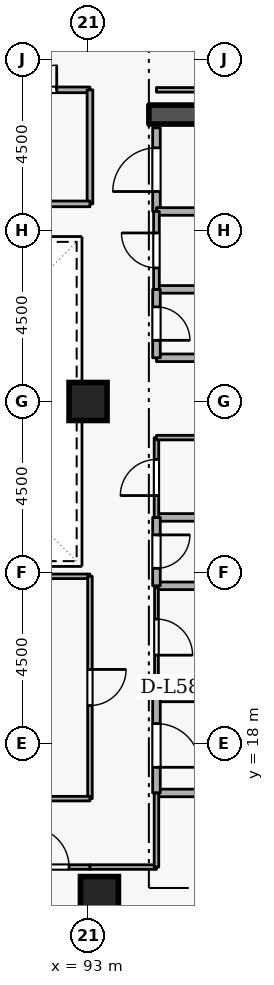
"""IFC4 building model, lengths in metres.
Left out: names, types, materials, properties, quantities, classifications, styles, units other than length and angle.
Written with IfcOpenShell. Run it as: python <this file> out.ifc"""

import sys

from ifc_helpers import new_model, si_unit, direction, frame, frame_2d, origin, origin_2d, place, context, subcontext, project, spatial, rectangle, extrude, element, fill, save


model = new_model("IFC4")
c1 = context("Model", 3, precision=1e-05, world=origin(), true_north=direction((0.0, 1.0)))
c2 = subcontext(c1, "Body", "Model", "MODEL_VIEW")
j1 = project(units=[si_unit("LENGTHUNIT", "METRE"), si_unit("PLANEANGLEUNIT", "RADIAN")], contexts=[c1])
p1 = place(None, origin())
s1 = spatial("IfcSite", under=j1, at=p1, CompositionType="ELEMENT")
p2 = place(p1, origin())
s2 = spatial("IfcBuilding", under=s1, at=p2, CompositionType="ELEMENT")
p3 = place(p2, frame((0.0, 0.0, 218.1)))
s3 = spatial("IfcBuildingStorey", under=s2, at=p3, CompositionType="ELEMENT", Elevation=218.1)
p4 = place(p3, frame((94.6, 34.55, 0.0), z_axis=(0.0, 0.0, 1.0), x_axis=(1.0, 0.0, 0.0)))
e1 = element("IfcWall", 1, at=p4, inside=s3, PredefinedType="SHEAR", context=c2, shape_type="SweptSolid", body=[
    extrude(rectangle(XDim=5.8, YDim=0.5, at=frame_2d((2.9, 0.0))), origin(), (0.0, 0.0, 1.0), 3.6),
])
for number, where, z_axis, x_axis in (
    (2, (93.3, 14.0, 0.0), (0.0, 0.0, 1.0), (1.0, 0.0, 0.0)),
    (3, (93.0, 27.0, 0.0), (0.0, 0.0, 1.0), (1.0, 0.0, 0.0)),
):
    element("IfcColumn", number, at=place(p3, frame(where, z_axis=z_axis, x_axis=x_axis)), inside=s3, PredefinedType="COLUMN", context=c2, shape_type="SweptSolid", body=[
        extrude(rectangle(XDim=1.0, YDim=1.0, at=origin_2d()), origin(), (0.0, 0.0, 1.0), 3.6),
    ])
p5 = place(p3, frame((94.8, 16.7, 0.0), z_axis=(0.0, 0.0, 1.0), x_axis=(1.0, 0.0, 0.0)))
e4 = element("IfcWall", 4, at=p5, inside=s3, PredefinedType="STANDARD", context=c2, shape_type="SweptSolid", body=[
    extrude(rectangle(XDim=5.7, YDim=0.2, at=frame_2d((2.85, 0.0))), origin(), (0.0, 0.0, 1.0), 3.26),
])
p6 = place(p3, frame((97.1, 19.2, 0.0), z_axis=(0.0, 0.0, 1.0), x_axis=(-1.0, 0.0, 0.0)))
e5 = element("IfcWall", 5, at=p6, inside=s3, PredefinedType="STANDARD", context=c2, shape_type="SweptSolid", body=[
    extrude(rectangle(XDim=2.3, YDim=0.2, at=frame_2d((1.15, 0.0))), origin(), (0.0, 0.0, 1.0), 2.465),
])
p7 = place(p3, frame((94.8, 19.2, 0.0), z_axis=(0.0, 0.0, 1.0), x_axis=(0.0, -1.0, 0.0)))
e6 = element("IfcWall", 6, at=p7, inside=s3, PredefinedType="STANDARD", context=c2, shape_type="SweptSolid", body=[
    extrude(rectangle(XDim=2.5, YDim=0.2, at=frame_2d((1.25, 0.0))), origin(), (0.0, 0.0, 1.0), 3.26),
])
p8 = place(p7, frame((0.675, 0.0, 0.0)))
e7 = element("IfcOpeningElement", 7, at=p8, cuts=e6, PredefinedType="OPENING", context=c2, shape_type="SweptSolid", body=[
    extrude(rectangle(XDim=1.15, YDim=2.1, at=frame_2d((0.575, 1.05))), frame((0.0, 0.11, 0.0), z_axis=(0.0, -1.0, 0.0), x_axis=(1.0, 0.0, 0.0)), (0.0, 0.0, 1.0), 0.22),
])
for number, where, z_axis, x_axis in (
    (8, (94.8, 28.15, 0.0), (0.0, 0.0, 1.0), (1.0, 0.0, 0.0)),
    (9, (96.85, 29.95, 0.0), (0.0, 0.0, 1.0), (-1.0, 0.0, 0.0)),
):
    element("IfcWall", number, at=place(p3, frame(where, z_axis=z_axis, x_axis=x_axis)), inside=s3, PredefinedType="STANDARD", context=c2, shape_type="SweptSolid", body=[
        extrude(rectangle(XDim=2.05, YDim=0.2, at=frame_2d((1.025, 0.0))), origin(), (0.0, 0.0, 1.0), 3.26),
    ])
p9 = place(p3, frame((94.8, 29.95, 0.0), z_axis=(0.0, 0.0, 1.0), x_axis=(0.0, -1.0, 0.0)))
e10 = element("IfcWall", 10, at=p9, inside=s3, PredefinedType="STANDARD", context=c2, shape_type="SweptSolid", body=[
    extrude(rectangle(XDim=1.8, YDim=0.2, at=frame_2d((0.9, 0.0))), origin(), (0.0, 0.0, 1.0), 3.26),
])
p10 = place(p9, frame((0.46, 0.0, 0.0)))
e11 = element("IfcOpeningElement", 11, at=p10, cuts=e10, PredefinedType="OPENING", context=c2, shape_type="SweptSolid", body=[
    extrude(rectangle(XDim=0.88, YDim=2.04, at=frame_2d((0.44, 1.02))), frame((0.0, 0.11, 0.0), z_axis=(0.0, -1.0, 0.0), x_axis=(1.0, 0.0, 0.0)), (0.0, 0.0, 1.0), 0.22),
])
for number, where, z_axis, x_axis in (
    (12, (94.8, 22.15, 0.0), (0.0, 0.0, 1.0), (1.0, 0.0, 0.0)),
    (13, (96.85, 23.95, 0.0), (0.0, 0.0, 1.0), (-1.0, 0.0, 0.0)),
):
    element("IfcWall", number, at=place(p3, frame(where, z_axis=z_axis, x_axis=x_axis)), inside=s3, PredefinedType="STANDARD", context=c2, shape_type="SweptSolid", body=[
        extrude(rectangle(XDim=2.05, YDim=0.2, at=frame_2d((1.025, 0.0))), origin(), (0.0, 0.0, 1.0), 3.26),
    ])
p11 = place(p3, frame((94.8, 23.95, 0.0), z_axis=(0.0, 0.0, 1.0), x_axis=(0.0, -1.0, 0.0)))
e14 = element("IfcWall", 14, at=p11, inside=s3, PredefinedType="STANDARD", context=c2, shape_type="SweptSolid", body=[
    extrude(rectangle(XDim=1.8, YDim=0.2, at=frame_2d((0.9, 0.0))), origin(), (0.0, 0.0, 1.0), 3.26),
])
p12 = place(p11, frame((0.46, 0.0, 0.0)))
e15 = element("IfcOpeningElement", 15, at=p12, cuts=e14, PredefinedType="OPENING", context=c2, shape_type="SweptSolid", body=[
    extrude(rectangle(XDim=0.88, YDim=2.04, at=frame_2d((0.44, 1.02))), frame((0.0, 0.11, 0.0), z_axis=(0.0, -1.0, 0.0), x_axis=(1.0, 0.0, 0.0)), (0.0, 0.0, 1.0), 0.22),
])
p13 = place(p3, frame((94.8, 32.0, 0.0), z_axis=(0.0, 0.0, 1.0), x_axis=(0.0, 1.0, 0.0)))
e16 = element("IfcWall", 16, at=p13, inside=s3, PredefinedType="STANDARD", context=c2, shape_type="SweptSolid", body=[
    extrude(rectangle(XDim=2.2, YDim=0.2, at=frame_2d((1.1, 0.0))), origin(), (0.0, 0.0, 1.0), 3.26),
])
p14 = place(p13, frame((0.525, 0.0, 0.0)))
e17 = element("IfcOpeningElement", 17, at=p14, cuts=e16, PredefinedType="OPENING", context=c2, shape_type="SweptSolid", body=[
    extrude(rectangle(XDim=1.15, YDim=2.1, at=frame_2d((0.575, 1.05))), frame((0.0, 0.11, 0.0), z_axis=(0.0, -1.0, 0.0), x_axis=(1.0, 0.0, 0.0)), (0.0, 0.0, 1.0), 0.22),
])
p15 = place(p3, frame((96.85, 32.0, 0.0), z_axis=(0.0, 0.0, 1.0), x_axis=(-1.0, 0.0, 0.0)))
e18 = element("IfcWall", 18, at=p15, inside=s3, PredefinedType="STANDARD", context=c2, shape_type="SweptSolid", body=[
    extrude(rectangle(XDim=2.05, YDim=0.2, at=frame_2d((1.025, 0.0))), origin(), (0.0, 0.0, 1.0), 3.26),
])
p16 = place(p3, frame((94.8, 19.5, 0.0), z_axis=(0.0, 0.0, 1.0), x_axis=(1.0, 0.0, 0.0)))
e19 = element("IfcWall", 19, at=p16, inside=s3, PredefinedType="PARTITIONING", context=c2, shape_type="SweptSolid", body=[
    extrude(rectangle(XDim=2.05, YDim=0.1, at=frame_2d((1.025, 0.0))), origin(), (0.0, 0.0, 1.0), 2.465),
])
p17 = place(p3, frame((94.8, 22.1, 0.0), z_axis=(0.0, 0.0, 1.0), x_axis=(0.0, -1.0, 0.0)))
e20 = element("IfcWall", 20, at=p17, inside=s3, PredefinedType="PARTITIONING", context=c2, shape_type="SweptSolid", body=[
    extrude(rectangle(XDim=2.6, YDim=0.1, at=frame_2d((1.3, 0.0))), origin(), (0.0, 0.0, 1.0), 3.26),
])
p18 = place(p17, frame((0.825, 0.0, 0.0)))
e21 = element("IfcOpeningElement", 21, at=p18, cuts=e20, PredefinedType="OPENING", context=c2, shape_type="SweptSolid", body=[
    extrude(rectangle(XDim=0.95, YDim=2.1, at=frame_2d((0.475, 1.05))), frame((0.0, 0.06, 0.0), z_axis=(0.0, -1.0, 0.0), x_axis=(1.0, 0.0, 0.0)), (0.0, 0.0, 1.0), 0.12),
])
p19 = place(p3, frame((94.8, 23.95, 0.0), z_axis=(0.0, 0.0, 1.0), x_axis=(0.0, 1.0, 0.0)))
e22 = element("IfcWall", 22, at=p19, inside=s3, PredefinedType="PARTITIONING", context=c2, shape_type="SweptSolid", body=[
    extrude(rectangle(XDim=2.1, YDim=0.12, at=frame_2d((1.05, 0.0))), origin(), (0.0, 0.0, 1.0), 3.26),
])
p20 = place(p19, frame((0.575, 0.0, 0.0)))
e23 = element("IfcOpeningElement", 23, at=p20, cuts=e22, PredefinedType="OPENING", context=c2, shape_type="SweptSolid", body=[
    extrude(rectangle(XDim=0.95, YDim=2.1, at=frame_2d((0.475, 1.05))), frame((0.0, 0.07, 0.0), z_axis=(0.0, -1.0, 0.0), x_axis=(1.0, 0.0, 0.0)), (0.0, 0.0, 1.0), 0.14),
])
p21 = place(p3, frame((94.8, 26.05, 0.0), z_axis=(0.0, 0.0, 1.0), x_axis=(1.0, 0.0, 0.0)))
e24 = element("IfcWall", 24, at=p21, inside=s3, PredefinedType="PARTITIONING", context=c2, shape_type="SweptSolid", body=[
    extrude(rectangle(XDim=2.05, YDim=0.12, at=frame_2d((1.025, 0.0))), origin(), (0.0, 0.0, 1.0), 3.26),
])
p22 = place(p3, frame((94.8, 29.95, 0.0), z_axis=(0.0, 0.0, 1.0), x_axis=(0.0, 1.0, 0.0)))
e25 = element("IfcWall", 25, at=p22, inside=s3, PredefinedType="PARTITIONING", context=c2, shape_type="SweptSolid", body=[
    extrude(rectangle(XDim=2.05, YDim=0.15, at=frame_2d((1.025, 0.0))), origin(), (0.0, 0.0, 1.0), 3.26),
])
p23 = place(p22, frame((0.565, 0.0, 0.0)))
e26 = element("IfcOpeningElement", 26, at=p23, cuts=e25, PredefinedType="OPENING", context=c2, shape_type="SweptSolid", body=[
    extrude(rectangle(XDim=0.92, YDim=2.08, at=frame_2d((0.46, 1.04))), frame((0.0, 0.085, 0.0), z_axis=(0.0, -1.0, 0.0), x_axis=(1.0, 0.0, 0.0)), (0.0, 0.0, 1.0), 0.17),
])
p24 = place(p3, frame((94.8, 35.2, 0.0), z_axis=(0.0, 0.0, 1.0), x_axis=(1.0, 0.0, 0.0)))
e27 = element("IfcWall", 27, at=p24, inside=s3, PredefinedType="PARTITIONING", context=c2, shape_type="SweptSolid", body=[
    extrude(rectangle(XDim=5.9, YDim=0.12, at=frame_2d((2.95, 0.0))), origin(), (0.0, 0.0, 1.0), 3.26),
])
p25 = place(p3, frame((90.9, 14.75, 0.0), z_axis=(0.0, 0.0, 1.0), x_axis=(1.0, 0.0, 0.0)))
e28 = element("IfcWall", 28, at=p25, inside=s3, PredefinedType="PARTITIONING", context=c2, shape_type="SweptSolid", body=[
    extrude(rectangle(XDim=2.15, YDim=0.12, at=frame_2d((1.075, 0.0))), origin(), (0.0, 0.0, 1.0), 3.26),
])
p26 = place(p25, frame((0.55, 0.0, 0.0)))
e29 = element("IfcOpeningElement", 29, at=p26, cuts=e28, PredefinedType="OPENING", context=c2, shape_type="SweptSolid", body=[
    extrude(rectangle(XDim=1.05, YDim=2.1, at=frame_2d((0.525, 1.05))), frame((0.0, 0.07, 0.0), z_axis=(0.0, -1.0, 0.0), x_axis=(1.0, 0.0, 0.0)), (0.0, 0.0, 1.0), 0.14),
])
p27 = place(p3, frame((93.05, 14.75, 0.0), z_axis=(0.0, 0.0, 1.0), x_axis=(1.0, 0.0, 0.0)))
e30 = element("IfcWall", 30, at=p27, inside=s3, PredefinedType="PARTITIONING", context=c2, shape_type="SweptSolid", body=[
    extrude(rectangle(XDim=1.75, YDim=0.12, at=frame_2d((0.875, 0.0))), origin(), (0.0, 0.0, 1.0), 3.26),
])
p28 = place(p3, frame((94.8, 14.75, 0.0), z_axis=(0.0, 0.0, 1.0), x_axis=(0.0, 1.0, 0.0)))
e31 = element("IfcWall", 31, at=p28, inside=s3, PredefinedType="PARTITIONING", context=c2, shape_type="SweptSolid", body=[
    extrude(rectangle(XDim=1.95, YDim=0.12, at=frame_2d((0.975, 0.0))), origin(), (0.0, 0.0, 1.0), 3.26),
])
p29 = place(p3, frame((89.3, 22.4, 0.0), z_axis=(0.0, 0.0, 1.0), x_axis=(1.0, 0.0, 0.0)))
e32 = element("IfcWall", 32, at=p29, inside=s3, PredefinedType="PARTITIONING", context=c2, shape_type="SweptSolid", body=[
    extrude(rectangle(XDim=3.75, YDim=0.12, at=frame_2d((1.875, 0.0))), origin(), (0.0, 0.0, 1.0), 3.26),
])
p30 = place(p3, frame((93.05, 22.4, 0.0), z_axis=(0.0, 0.0, 1.0), x_axis=(0.0, -1.0, 0.0)))
e33 = element("IfcWall", 33, at=p30, inside=s3, PredefinedType="PARTITIONING", context=c2, shape_type="SweptSolid", body=[
    extrude(rectangle(XDim=5.85, YDim=0.12, at=frame_2d((2.925, 0.0))), origin(), (0.0, 0.0, 1.0), 3.26),
])
p31 = place(p30, frame((2.45, 0.0, 0.0)))
e34 = element("IfcOpeningElement", 34, at=p31, cuts=e33, PredefinedType="OPENING", context=c2, shape_type="SweptSolid", body=[
    extrude(rectangle(XDim=0.95, YDim=2.1, at=frame_2d((0.475, 1.05))), frame((0.0, 0.07, 0.0), z_axis=(0.0, -1.0, 0.0), x_axis=(1.0, 0.0, 0.0)), (0.0, 0.0, 1.0), 0.14),
])
p32 = place(p3, frame((93.05, 16.55, 0.0), z_axis=(0.0, 0.0, 1.0), x_axis=(-1.0, 0.0, 0.0)))
e35 = element("IfcWall", 35, at=p32, inside=s3, PredefinedType="PARTITIONING", context=c2, shape_type="SweptSolid", body=[
    extrude(rectangle(XDim=3.75, YDim=0.12, at=frame_2d((1.875, 0.0))), origin(), (0.0, 0.0, 1.0), 3.26),
])
p33 = place(p3, frame((90.0, 35.2, 0.0), z_axis=(0.0, 0.0, 1.0), x_axis=(1.0, 0.0, 0.0)))
e36 = element("IfcWall", 36, at=p33, inside=s3, PredefinedType="PARTITIONING", context=c2, shape_type="SweptSolid", body=[
    extrude(rectangle(XDim=3.05, YDim=0.15, at=frame_2d((1.525, 0.0))), origin(), (0.0, 0.0, 1.0), 3.26),
])
p34 = place(p33, frame((0.875, 0.0, 0.0)))
e37 = element("IfcOpeningElement", 37, at=p34, cuts=e36, PredefinedType="OPENING", context=c2, shape_type="SweptSolid", body=[
    extrude(rectangle(XDim=1.3, YDim=2.12, at=frame_2d((0.65, 1.06))), frame((0.0, 0.085, 0.0), z_axis=(0.0, -1.0, 0.0), x_axis=(1.0, 0.0, 0.0)), (0.0, 0.0, 1.0), 0.17),
])
p35 = place(p3, frame((93.05, 35.2, 0.0), z_axis=(0.0, 0.0, 1.0), x_axis=(0.0, -1.0, 0.0)))
e38 = element("IfcWall", 38, at=p35, inside=s3, PredefinedType="PARTITIONING", context=c2, shape_type="SweptSolid", body=[
    extrude(rectangle(XDim=3.0, YDim=0.15, at=frame_2d((1.5, 0.0))), origin(), (0.0, 0.0, 1.0), 3.26),
])
p36 = place(p3, frame((93.05, 32.2, 0.0), z_axis=(0.0, 0.0, 1.0), x_axis=(-1.0, 0.0, 0.0)))
e39 = element("IfcWall", 39, at=p36, inside=s3, PredefinedType="PARTITIONING", context=c2, shape_type="SweptSolid", body=[
    extrude(rectangle(XDim=3.05, YDim=0.15, at=frame_2d((1.525, 0.0))), origin(), (0.0, 0.0, 1.0), 3.26),
])
p37 = place(p8, origin())
e40 = element("IfcDoor", 40, at=p37, inside=s3, OperationType="SINGLE_SWING_RIGHT", PredefinedType="DOOR", context=c2, shape_type="SweptSolid", body=[
    extrude(rectangle(XDim=1.15, YDim=2.1, at=frame_2d((0.575, 1.05))), frame((0.0, 0.025, 0.0), z_axis=(0.0, -1.0, 0.0), x_axis=(1.0, 0.0, 0.0)), (0.0, 0.0, 1.0), 0.05),
])
fill(e7, e40)
p38 = place(p10, origin())
e41 = element("IfcDoor", 41, at=p38, inside=s3, OperationType="SINGLE_SWING_RIGHT", PredefinedType="DOOR", context=c2, shape_type="SweptSolid", body=[
    extrude(rectangle(XDim=0.88, YDim=2.04, at=frame_2d((0.44, 1.02))), frame((0.0, 0.025, 0.0), z_axis=(0.0, -1.0, 0.0), x_axis=(1.0, 0.0, 0.0)), (0.0, 0.0, 1.0), 0.05),
])
fill(e11, e41)
p39 = place(p12, origin())
e42 = element("IfcDoor", 42, at=p39, inside=s3, OperationType="SINGLE_SWING_LEFT", PredefinedType="DOOR", context=c2, shape_type="SweptSolid", body=[
    extrude(rectangle(XDim=0.88, YDim=2.04, at=frame_2d((0.44, 1.02))), frame((0.0, 0.025, 0.0), z_axis=(0.0, -1.0, 0.0), x_axis=(1.0, 0.0, 0.0)), (0.0, 0.0, 1.0), 0.05),
])
fill(e15, e42)
p40 = place(p18, origin())
e43 = element("IfcDoor", 43, at=p40, inside=s3, OperationType="SINGLE_SWING_RIGHT", PredefinedType="DOOR", context=c2, shape_type="SweptSolid", body=[
    extrude(rectangle(XDim=0.95, YDim=2.1, at=frame_2d((0.475, 1.05))), frame((0.0, 0.025, 0.0), z_axis=(0.0, -1.0, 0.0), x_axis=(1.0, 0.0, 0.0)), (0.0, 0.0, 1.0), 0.05),
])
fill(e21, e43)
p41 = place(p20, origin())
e44 = element("IfcDoor", 44, at=p41, inside=s3, OperationType="SINGLE_SWING_LEFT", PredefinedType="DOOR", context=c2, shape_type="SweptSolid", body=[
    extrude(rectangle(XDim=0.95, YDim=2.1, at=frame_2d((0.475, 1.05))), frame((0.0, 0.025, 0.0), z_axis=(0.0, -1.0, 0.0), x_axis=(1.0, 0.0, 0.0)), (0.0, 0.0, 1.0), 0.05),
])
fill(e23, e44)
p42 = place(p23, origin())
e45 = element("IfcDoor", 45, at=p42, inside=s3, OperationType="SINGLE_SWING_RIGHT", PredefinedType="DOOR", context=c2, shape_type="SweptSolid", body=[
    extrude(rectangle(XDim=0.92, YDim=2.08, at=frame_2d((0.46, 1.04))), frame((0.0, 0.025, 0.0), z_axis=(0.0, -1.0, 0.0), x_axis=(1.0, 0.0, 0.0)), (0.0, 0.0, 1.0), 0.05),
])
fill(e26, e45)
p43 = place(p14, origin())
e46 = element("IfcDoor", 46, at=p43, inside=s3, OperationType="SINGLE_SWING_LEFT", PredefinedType="DOOR", context=c2, shape_type="SweptSolid", body=[
    extrude(rectangle(XDim=1.15, YDim=2.1, at=frame_2d((0.575, 1.05))), frame((0.0, 0.025, 0.0), z_axis=(0.0, -1.0, 0.0), x_axis=(1.0, 0.0, 0.0)), (0.0, 0.0, 1.0), 0.05),
])
fill(e17, e46)
p44 = place(p26, origin())
e47 = element("IfcDoor", 47, at=p44, inside=s3, OperationType="SINGLE_SWING_LEFT", PredefinedType="DOOR", context=c2, shape_type="SweptSolid", body=[
    extrude(rectangle(XDim=1.05, YDim=2.1, at=frame_2d((0.525, 1.05))), frame((0.0, 0.025, 0.0), z_axis=(0.0, -1.0, 0.0), x_axis=(1.0, 0.0, 0.0)), (0.0, 0.0, 1.0), 0.05),
])
fill(e29, e47)
p45 = place(p31, origin())
e48 = element("IfcDoor", 48, at=p45, inside=s3, OperationType="SINGLE_SWING_LEFT", PredefinedType="DOOR", context=c2, shape_type="SweptSolid", body=[
    extrude(rectangle(XDim=0.95, YDim=2.1, at=frame_2d((0.475, 1.05))), frame((0.0, 0.025, 0.0), z_axis=(0.0, -1.0, 0.0), x_axis=(1.0, 0.0, 0.0)), (0.0, 0.0, 1.0), 0.05),
])
fill(e34, e48)
p46 = place(p34, origin())
e49 = element("IfcDoor", 49, at=p46, inside=s3, OperationType="DOUBLE_DOOR_SINGLE_SWING", PredefinedType="DOOR", context=c2, shape_type="SweptSolid", body=[
    extrude(rectangle(XDim=1.3, YDim=2.12, at=frame_2d((0.65, 1.06))), frame((0.0, 0.025, 0.0), z_axis=(0.0, -1.0, 0.0), x_axis=(1.0, 0.0, 0.0)), (0.0, 0.0, 1.0), 0.05),
])
fill(e37, e49)
save(model, sys.argv[1])
